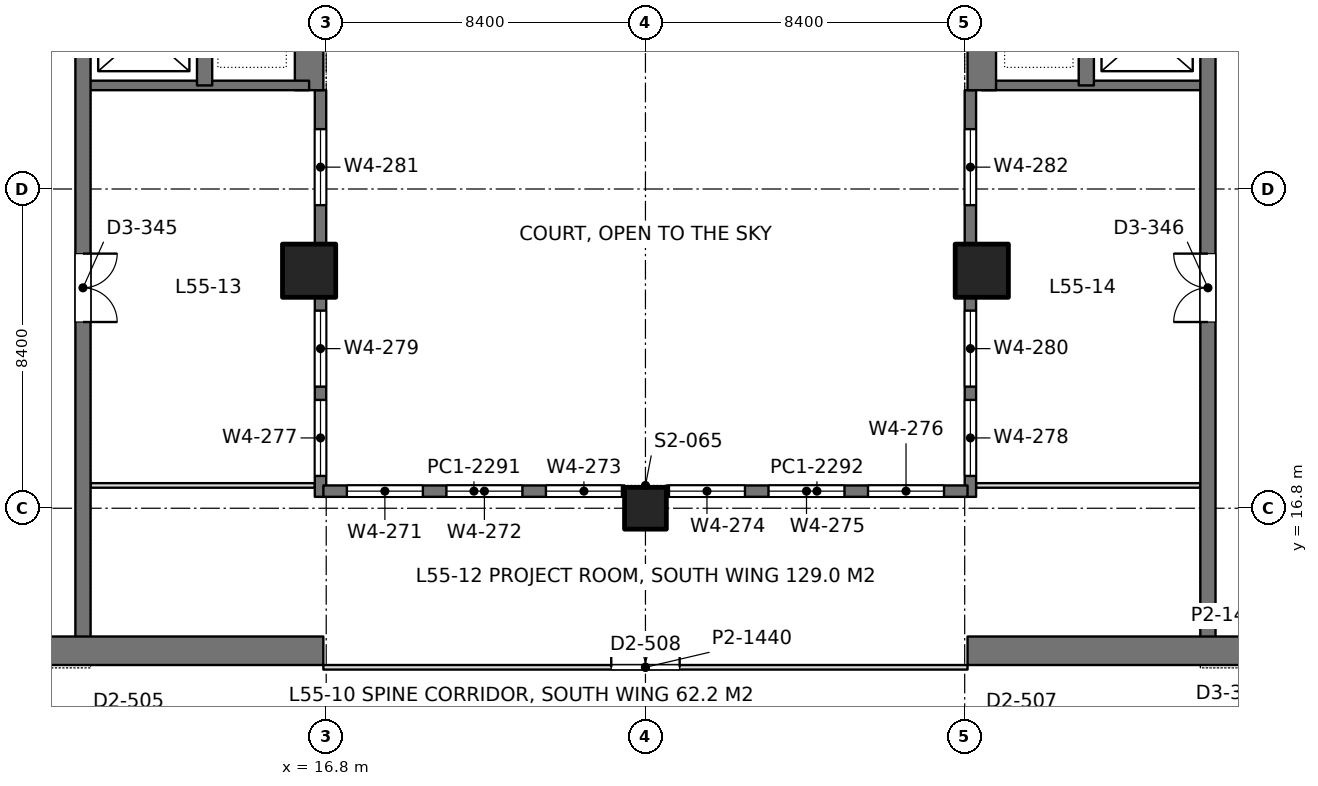
"""IFC4 building model, lengths in metres.
Left out: names, types, materials, properties, quantities, classifications, styles, units other than length and angle.
Written with IfcOpenShell. Run it as: python <this file> out.ifc"""

import sys

from ifc_helpers import new_model, si_unit, direction, frame, frame_2d, origin, origin_2d, place, context, subcontext, project, spatial, rectangle, extrude, element, fill, save


model = new_model("IFC4")
c1 = context("Model", 3, precision=1e-05, world=origin(), true_north=direction((0.0, 1.0)))
c2 = subcontext(c1, "Body", "Model", "MODEL_VIEW")
j1 = project(units=[si_unit("LENGTHUNIT", "METRE"), si_unit("PLANEANGLEUNIT", "RADIAN")], contexts=[c1])
p1 = place(None, origin())
s1 = spatial("IfcSite", under=j1, at=p1, CompositionType="ELEMENT")
p2 = place(p1, origin())
s2 = spatial("IfcBuilding", under=s1, at=p2, CompositionType="ELEMENT")
p3 = place(p2, frame((0.0, 0.0, 240.6)))
s3 = spatial("IfcBuildingStorey", under=s2, at=p3, CompositionType="ELEMENT", Elevation=240.6)
p4 = place(p3, frame((25.2, 16.8, 0.0), z_axis=(0.0, 0.0, 1.0), x_axis=(1.0, 0.0, 0.0)))
e1 = element("IfcColumn", 1, at=p4, inside=s3, PredefinedType="COLUMN", context=c2, shape_type="SweptSolid", body=[
    extrude(rectangle(XDim=1.1, YDim=1.1, at=origin_2d()), origin(), (0.0, 0.0, 1.0), 4.2),
])
for number, where, z_axis, x_axis in (
    (2, (16.35, 23.05, 0.0), (0.0, 0.0, 1.0), (1.0, 0.0, 0.0)),
    (3, (34.05, 23.05, 0.0), (0.0, 0.0, 1.0), (1.0, 0.0, 0.0)),
):
    element("IfcColumn", number, at=place(p3, frame(where, z_axis=z_axis, x_axis=x_axis)), inside=s3, PredefinedType="COLUMN", context=c2, shape_type="SweptSolid", body=[
        extrude(rectangle(XDim=1.4, YDim=1.4, at=origin_2d()), origin(), (0.0, 0.0, 1.0), 4.2),
    ])
p5 = place(p3, frame((-1.125, 13.05, 0.0), z_axis=(0.0, 0.0, 1.0), x_axis=(1.0, 0.0, 0.0)))
e4 = element("IfcWall", 4, at=p5, inside=s3, PredefinedType="SHEAR", context=c2, shape_type="SweptSolid", body=[
    extrude(rectangle(XDim=17.85, YDim=0.75, at=frame_2d((8.925, 0.0))), origin(), (0.0, 0.0, 1.0), 4.2),
])
p6 = place(p5, frame((8.875, 0.0, 0.0)))
e5 = element("IfcOpeningElement", 5, at=p6, cuts=e4, PredefinedType="OPENING", context=c2, shape_type="SweptSolid", body=[
    extrude(rectangle(XDim=1.8, YDim=2.4, at=frame_2d((0.9, 1.2))), frame((0.0, 0.385, 0.0), z_axis=(0.0, -1.0, 0.0), x_axis=(1.0, 0.0, 0.0)), (0.0, 0.0, 1.0), 0.77),
])
p7 = place(p3, frame((16.35, 27.8, 0.0), z_axis=(0.0, 0.0, 1.0), x_axis=(0.0, 1.0, 0.0)))
e6 = element("IfcWall", 6, at=p7, inside=s3, PredefinedType="SHEAR", context=c2, shape_type="SweptSolid", body=[
    extrude(rectangle(XDim=9.55, YDim=0.75, at=frame_2d((4.775, 0.0))), origin(), (0.0, 0.0, 1.0), 4.2),
])
p8 = place(p3, frame((10.4, 13.05, 0.0), z_axis=(0.0, 0.0, 1.0), x_axis=(0.0, 1.0, 0.0)))
e7 = element("IfcWall", 7, at=p8, inside=s3, PredefinedType="SHEAR", context=c2, shape_type="SweptSolid", body=[
    extrude(rectangle(XDim=24.3, YDim=0.4, at=frame_2d((12.15, 0.0))), origin(), (0.0, 0.0, 1.0), 4.2),
])
p9 = place(p8, frame((15.75, 0.0, 0.0)))
e8 = element("IfcOpeningElement", 8, at=p9, cuts=e7, PredefinedType="OPENING", context=c2, shape_type="SweptSolid", body=[
    extrude(rectangle(XDim=1.1, YDim=2.2, at=frame_2d((0.55, 1.1))), frame((0.0, 0.21, 0.0), z_axis=(0.0, -1.0, 0.0), x_axis=(1.0, 0.0, 0.0)), (0.0, 0.0, 1.0), 0.42),
])
p10 = place(p8, frame((18.6, 0.0, 0.0)))
e9 = element("IfcOpeningElement", 9, at=p10, cuts=e7, PredefinedType="OPENING", context=c2, shape_type="SweptSolid", body=[
    extrude(rectangle(XDim=1.1, YDim=2.2, at=frame_2d((0.55, 1.1))), frame((0.0, 0.21, 0.0), z_axis=(0.0, -1.0, 0.0), x_axis=(1.0, 0.0, 0.0)), (0.0, 0.0, 1.0), 0.42),
])
p11 = place(p8, frame((21.45, 0.0, 0.0)))
e10 = element("IfcOpeningElement", 10, at=p11, cuts=e7, PredefinedType="OPENING", context=c2, shape_type="SweptSolid", body=[
    extrude(rectangle(XDim=1.1, YDim=2.2, at=frame_2d((0.55, 1.1))), frame((0.0, 0.21, 0.0), z_axis=(0.0, -1.0, 0.0), x_axis=(1.0, 0.0, 0.0)), (0.0, 0.0, 1.0), 0.42),
])
p12 = place(p8, frame((8.65, 0.0, 0.0)))
e11 = element("IfcOpeningElement", 11, at=p12, cuts=e7, PredefinedType="OPENING", context=c2, shape_type="SweptSolid", body=[
    extrude(rectangle(XDim=1.8, YDim=2.4, at=frame_2d((0.9, 1.2))), frame((0.0, 0.21, 0.0), z_axis=(0.0, -1.0, 0.0), x_axis=(1.0, 0.0, 0.0)), (0.0, 0.0, 1.0), 0.42),
])
p13 = place(p3, frame((13.6, 27.925, 0.0), z_axis=(0.0, 0.0, 1.0), x_axis=(0.0, 1.0, 0.0)))
e12 = element("IfcWall", 12, at=p13, inside=s3, PredefinedType="SHEAR", context=c2, shape_type="SweptSolid", body=[
    extrude(rectangle(XDim=9.425, YDim=0.4, at=frame_2d((4.712, 0.0))), origin(), (0.0, 0.0, 1.0), 4.2),
])
p14 = place(p3, frame((10.4, 27.925, 0.0), z_axis=(0.0, 0.0, 1.0), x_axis=(1.0, 0.0, 0.0)))
e13 = element("IfcWall", 13, at=p14, inside=s3, PredefinedType="SHEAR", context=c2, shape_type="SweptSolid", body=[
    extrude(rectangle(XDim=5.95, YDim=0.25, at=frame_2d((2.975, 0.0))), origin(), (0.0, 0.0, 1.0), 4.2),
])
p15 = place(p3, frame((33.675, 13.05, 0.0), z_axis=(0.0, 0.0, 1.0), x_axis=(1.0, 0.0, 0.0)))
e14 = element("IfcWall", 14, at=p15, inside=s3, PredefinedType="SHEAR", context=c2, shape_type="SweptSolid", body=[
    extrude(rectangle(XDim=17.85, YDim=0.75, at=frame_2d((8.925, 0.0))), origin(), (0.0, 0.0, 1.0), 4.2),
])
p16 = place(p15, frame((7.175, 0.0, 0.0)))
e15 = element("IfcOpeningElement", 15, at=p16, cuts=e14, PredefinedType="OPENING", context=c2, shape_type="SweptSolid", body=[
    extrude(rectangle(XDim=1.8, YDim=2.4, at=frame_2d((0.9, 1.2))), frame((0.0, 0.385, 0.0), z_axis=(0.0, -1.0, 0.0), x_axis=(1.0, 0.0, 0.0)), (0.0, 0.0, 1.0), 0.77),
])
p17 = place(p3, frame((34.05, 27.8, 0.0), z_axis=(0.0, 0.0, 1.0), x_axis=(0.0, 1.0, 0.0)))
e16 = element("IfcWall", 16, at=p17, inside=s3, PredefinedType="SHEAR", context=c2, shape_type="SweptSolid", body=[
    extrude(rectangle(XDim=9.55, YDim=0.75, at=frame_2d((4.775, 0.0))), origin(), (0.0, 0.0, 1.0), 4.2),
])
p18 = place(p3, frame((40.0, 13.05, 0.0), z_axis=(0.0, 0.0, 1.0), x_axis=(0.0, 1.0, 0.0)))
e17 = element("IfcWall", 17, at=p18, inside=s3, PredefinedType="SHEAR", context=c2, shape_type="SweptSolid", body=[
    extrude(rectangle(XDim=24.3, YDim=0.4, at=frame_2d((12.15, 0.0))), origin(), (0.0, 0.0, 1.0), 4.2),
])
p19 = place(p18, frame((15.75, 0.0, 0.0)))
e18 = element("IfcOpeningElement", 18, at=p19, cuts=e17, PredefinedType="OPENING", context=c2, shape_type="SweptSolid", body=[
    extrude(rectangle(XDim=1.1, YDim=2.2, at=frame_2d((0.55, 1.1))), frame((0.0, 0.21, 0.0), z_axis=(0.0, -1.0, 0.0), x_axis=(1.0, 0.0, 0.0)), (0.0, 0.0, 1.0), 0.42),
])
p20 = place(p18, frame((18.6, 0.0, 0.0)))
e19 = element("IfcOpeningElement", 19, at=p20, cuts=e17, PredefinedType="OPENING", context=c2, shape_type="SweptSolid", body=[
    extrude(rectangle(XDim=1.1, YDim=2.2, at=frame_2d((0.55, 1.1))), frame((0.0, 0.21, 0.0), z_axis=(0.0, -1.0, 0.0), x_axis=(1.0, 0.0, 0.0)), (0.0, 0.0, 1.0), 0.42),
])
p21 = place(p18, frame((21.45, 0.0, 0.0)))
e20 = element("IfcOpeningElement", 20, at=p21, cuts=e17, PredefinedType="OPENING", context=c2, shape_type="SweptSolid", body=[
    extrude(rectangle(XDim=1.1, YDim=2.2, at=frame_2d((0.55, 1.1))), frame((0.0, 0.21, 0.0), z_axis=(0.0, -1.0, 0.0), x_axis=(1.0, 0.0, 0.0)), (0.0, 0.0, 1.0), 0.42),
])
p22 = place(p18, frame((8.65, 0.0, 0.0)))
e21 = element("IfcOpeningElement", 21, at=p22, cuts=e17, PredefinedType="OPENING", context=c2, shape_type="SweptSolid", body=[
    extrude(rectangle(XDim=1.8, YDim=2.4, at=frame_2d((0.9, 1.2))), frame((0.0, 0.21, 0.0), z_axis=(0.0, -1.0, 0.0), x_axis=(1.0, 0.0, 0.0)), (0.0, 0.0, 1.0), 0.42),
])
p23 = place(p3, frame((36.8, 27.925, 0.0), z_axis=(0.0, 0.0, 1.0), x_axis=(0.0, 1.0, 0.0)))
e22 = element("IfcWall", 22, at=p23, inside=s3, PredefinedType="SHEAR", context=c2, shape_type="SweptSolid", body=[
    extrude(rectangle(XDim=9.425, YDim=0.4, at=frame_2d((4.712, 0.0))), origin(), (0.0, 0.0, 1.0), 4.2),
])
p24 = place(p3, frame((40.0, 27.925, 0.0), z_axis=(0.0, 0.0, 1.0), x_axis=(-1.0, 0.0, 0.0)))
e23 = element("IfcWall", 23, at=p24, inside=s3, PredefinedType="SHEAR", context=c2, shape_type="SweptSolid", body=[
    extrude(rectangle(XDim=5.95, YDim=0.25, at=frame_2d((2.975, 0.0))), origin(), (0.0, 0.0, 1.0), 4.2),
])
p25 = place(p3, frame((16.65, 17.1, 0.0), z_axis=(0.0, 0.0, 1.0), x_axis=(0.0, 1.0, 0.0)))
e24 = element("IfcWall", 24, at=p25, inside=s3, PredefinedType="SOLIDWALL", context=c2, shape_type="SweptSolid", body=[
    extrude(rectangle(XDim=10.7, YDim=0.3, at=frame_2d((5.35, 0.0))), origin(), (0.0, 0.0, 1.0), 4.0),
])
p26 = place(p25, frame((0.55, 0.0, 0.9)))
e25 = element("IfcOpeningElement", 25, at=p26, cuts=e24, PredefinedType="OPENING", context=c2, shape_type="SweptSolid", body=[
    extrude(rectangle(XDim=2.0, YDim=1.9, at=frame_2d((1.0, 0.95))), frame((0.0, 0.16, 0.0), z_axis=(0.0, -1.0, 0.0), x_axis=(1.0, 0.0, 0.0)), (0.0, 0.0, 1.0), 0.32),
])
p27 = place(p25, frame((2.9, 0.0, 0.9)))
e26 = element("IfcOpeningElement", 26, at=p27, cuts=e24, PredefinedType="OPENING", context=c2, shape_type="SweptSolid", body=[
    extrude(rectangle(XDim=2.0, YDim=1.9, at=frame_2d((1.0, 0.95))), frame((0.0, 0.16, 0.0), z_axis=(0.0, -1.0, 0.0), x_axis=(1.0, 0.0, 0.0)), (0.0, 0.0, 1.0), 0.32),
])
p28 = place(p25, frame((7.675, 0.0, 0.9)))
e27 = element("IfcOpeningElement", 27, at=p28, cuts=e24, PredefinedType="OPENING", context=c2, shape_type="SweptSolid", body=[
    extrude(rectangle(XDim=2.0, YDim=1.9, at=frame_2d((1.0, 0.95))), frame((0.0, 0.16, 0.0), z_axis=(0.0, -1.0, 0.0), x_axis=(1.0, 0.0, 0.0)), (0.0, 0.0, 1.0), 0.32),
])
p29 = place(p3, frame((33.75, 17.1, 0.0), z_axis=(0.0, 0.0, 1.0), x_axis=(0.0, 1.0, 0.0)))
e28 = element("IfcWall", 28, at=p29, inside=s3, PredefinedType="SOLIDWALL", context=c2, shape_type="SweptSolid", body=[
    extrude(rectangle(XDim=10.7, YDim=0.3, at=frame_2d((5.35, 0.0))), origin(), (0.0, 0.0, 1.0), 4.0),
])
p30 = place(p29, frame((0.55, 0.0, 0.9)))
e29 = element("IfcOpeningElement", 29, at=p30, cuts=e28, PredefinedType="OPENING", context=c2, shape_type="SweptSolid", body=[
    extrude(rectangle(XDim=2.0, YDim=1.9, at=frame_2d((1.0, 0.95))), frame((0.0, 0.16, 0.0), z_axis=(0.0, -1.0, 0.0), x_axis=(1.0, 0.0, 0.0)), (0.0, 0.0, 1.0), 0.32),
])
p31 = place(p29, frame((2.9, 0.0, 0.9)))
e30 = element("IfcOpeningElement", 30, at=p31, cuts=e28, PredefinedType="OPENING", context=c2, shape_type="SweptSolid", body=[
    extrude(rectangle(XDim=2.0, YDim=1.9, at=frame_2d((1.0, 0.95))), frame((0.0, 0.16, 0.0), z_axis=(0.0, -1.0, 0.0), x_axis=(1.0, 0.0, 0.0)), (0.0, 0.0, 1.0), 0.32),
])
p32 = place(p29, frame((7.675, 0.0, 0.9)))
e31 = element("IfcOpeningElement", 31, at=p32, cuts=e28, PredefinedType="OPENING", context=c2, shape_type="SweptSolid", body=[
    extrude(rectangle(XDim=2.0, YDim=1.9, at=frame_2d((1.0, 0.95))), frame((0.0, 0.16, 0.0), z_axis=(0.0, -1.0, 0.0), x_axis=(1.0, 0.0, 0.0)), (0.0, 0.0, 1.0), 0.32),
])
p33 = place(p3, frame((16.725, 17.25, 0.0), z_axis=(0.0, 0.0, 1.0), x_axis=(1.0, 0.0, 0.0)))
e32 = element("IfcWall", 32, at=p33, inside=s3, PredefinedType="SOLIDWALL", context=c2, shape_type="SweptSolid", body=[
    extrude(rectangle(XDim=7.925, YDim=0.3, at=frame_2d((3.962, 0.0))), origin(), (0.0, 0.0, 1.0), 4.0),
])
p34 = place(p33, frame((0.619, 0.0, 0.9)))
e33 = element("IfcOpeningElement", 33, at=p34, cuts=e32, PredefinedType="OPENING", context=c2, shape_type="SweptSolid", body=[
    extrude(rectangle(XDim=2.0, YDim=1.9, at=frame_2d((1.0, 0.95))), frame((0.0, 0.16, 0.0), z_axis=(0.0, -1.0, 0.0), x_axis=(1.0, 0.0, 0.0)), (0.0, 0.0, 1.0), 0.32),
])
p35 = place(p33, frame((3.238, 0.0, 0.9)))
e34 = element("IfcOpeningElement", 34, at=p35, cuts=e32, PredefinedType="OPENING", context=c2, shape_type="SweptSolid", body=[
    extrude(rectangle(XDim=2.0, YDim=1.9, at=frame_2d((1.0, 0.95))), frame((0.0, 0.16, 0.0), z_axis=(0.0, -1.0, 0.0), x_axis=(1.0, 0.0, 0.0)), (0.0, 0.0, 1.0), 0.32),
])
p36 = place(p33, frame((5.856, 0.0, 0.9)))
e35 = element("IfcOpeningElement", 35, at=p36, cuts=e32, PredefinedType="OPENING", context=c2, shape_type="SweptSolid", body=[
    extrude(rectangle(XDim=2.0, YDim=1.9, at=frame_2d((1.0, 0.95))), frame((0.0, 0.16, 0.0), z_axis=(0.0, -1.0, 0.0), x_axis=(1.0, 0.0, 0.0)), (0.0, 0.0, 1.0), 0.32),
])
p37 = place(p3, frame((25.75, 17.25, 0.0), z_axis=(0.0, 0.0, 1.0), x_axis=(1.0, 0.0, 0.0)))
e36 = element("IfcWall", 36, at=p37, inside=s3, PredefinedType="SOLIDWALL", context=c2, shape_type="SweptSolid", body=[
    extrude(rectangle(XDim=7.925, YDim=0.3, at=frame_2d((3.962, 0.0))), origin(), (0.0, 0.0, 1.0), 4.0),
])
p38 = place(p37, frame((0.069, 0.0, 0.9)))
e37 = element("IfcOpeningElement", 37, at=p38, cuts=e36, PredefinedType="OPENING", context=c2, shape_type="SweptSolid", body=[
    extrude(rectangle(XDim=2.0, YDim=1.9, at=frame_2d((1.0, 0.95))), frame((0.0, 0.16, 0.0), z_axis=(0.0, -1.0, 0.0), x_axis=(1.0, 0.0, 0.0)), (0.0, 0.0, 1.0), 0.32),
])
p39 = place(p37, frame((2.688, 0.0, 0.9)))
e38 = element("IfcOpeningElement", 38, at=p39, cuts=e36, PredefinedType="OPENING", context=c2, shape_type="SweptSolid", body=[
    extrude(rectangle(XDim=2.0, YDim=1.9, at=frame_2d((1.0, 0.95))), frame((0.0, 0.16, 0.0), z_axis=(0.0, -1.0, 0.0), x_axis=(1.0, 0.0, 0.0)), (0.0, 0.0, 1.0), 0.32),
])
p40 = place(p37, frame((5.306, 0.0, 0.9)))
e39 = element("IfcOpeningElement", 39, at=p40, cuts=e36, PredefinedType="OPENING", context=c2, shape_type="SweptSolid", body=[
    extrude(rectangle(XDim=2.0, YDim=1.9, at=frame_2d((1.0, 0.95))), frame((0.0, 0.16, 0.0), z_axis=(0.0, -1.0, 0.0), x_axis=(1.0, 0.0, 0.0)), (0.0, 0.0, 1.0), 0.32),
])
for number, where, z_axis, x_axis in (
    (40, (10.598, 17.4, 0.0), (0.0, 0.0, 1.0), (1.0, 0.0, 0.0)),
    (41, (33.898, 17.4, 0.0), (0.0, 0.0, 1.0), (1.0, 0.0, 0.0)),
):
    element("IfcWall", number, at=place(p3, frame(where, z_axis=z_axis, x_axis=x_axis)), inside=s3, PredefinedType="PARTITIONING", context=c2, shape_type="SweptSolid", body=[
        extrude(rectangle(XDim=5.904, YDim=0.12, at=frame_2d((2.952, 0.0))), origin(), (0.0, 0.0, 1.0), 3.3),
    ])
p41 = place(p3, frame((16.725, 12.615, 0.0), z_axis=(0.0, 0.0, 1.0), x_axis=(1.0, 0.0, 0.0)))
e42 = element("IfcWall", 42, at=p41, inside=s3, PredefinedType="PARTITIONING", context=c2, shape_type="SweptSolid", body=[
    extrude(rectangle(XDim=16.95, YDim=0.12, at=frame_2d((8.475, 0.0))), origin(), (0.0, 0.0, 1.0), 3.3),
])
p42 = place(p41, frame((7.575, 0.0, 0.0)))
e43 = element("IfcOpeningElement", 43, at=p42, cuts=e42, PredefinedType="OPENING", context=c2, shape_type="SweptSolid", body=[
    extrude(rectangle(XDim=1.8, YDim=2.2, at=frame_2d((0.9, 1.1))), frame((0.0, 0.07, 0.0), z_axis=(0.0, -1.0, 0.0), x_axis=(1.0, 0.0, 0.0)), (0.0, 0.0, 1.0), 0.14),
])
p43 = place(p26, origin())
e44 = element("IfcWindow", 44, at=p43, inside=s3, PartitioningType="SINGLE_PANEL", PredefinedType="WINDOW", context=c2, shape_type="SweptSolid", body=[
    extrude(rectangle(XDim=2.0, YDim=1.9, at=frame_2d((1.0, 0.95))), frame((0.0, 0.03, 0.0), z_axis=(0.0, -1.0, 0.0), x_axis=(1.0, 0.0, 0.0)), (0.0, 0.0, 1.0), 0.06),
])
fill(e25, e44)
p44 = place(p27, origin())
e45 = element("IfcWindow", 45, at=p44, inside=s3, PartitioningType="SINGLE_PANEL", PredefinedType="WINDOW", context=c2, shape_type="SweptSolid", body=[
    extrude(rectangle(XDim=2.0, YDim=1.9, at=frame_2d((1.0, 0.95))), frame((0.0, 0.03, 0.0), z_axis=(0.0, -1.0, 0.0), x_axis=(1.0, 0.0, 0.0)), (0.0, 0.0, 1.0), 0.06),
])
fill(e26, e45)
p45 = place(p28, origin())
e46 = element("IfcWindow", 46, at=p45, inside=s3, PartitioningType="SINGLE_PANEL", PredefinedType="WINDOW", context=c2, shape_type="SweptSolid", body=[
    extrude(rectangle(XDim=2.0, YDim=1.9, at=frame_2d((1.0, 0.95))), frame((0.0, 0.03, 0.0), z_axis=(0.0, -1.0, 0.0), x_axis=(1.0, 0.0, 0.0)), (0.0, 0.0, 1.0), 0.06),
])
fill(e27, e46)
p46 = place(p30, origin())
e47 = element("IfcWindow", 47, at=p46, inside=s3, PartitioningType="SINGLE_PANEL", PredefinedType="WINDOW", context=c2, shape_type="SweptSolid", body=[
    extrude(rectangle(XDim=2.0, YDim=1.9, at=frame_2d((1.0, 0.95))), frame((0.0, 0.03, 0.0), z_axis=(0.0, -1.0, 0.0), x_axis=(1.0, 0.0, 0.0)), (0.0, 0.0, 1.0), 0.06),
])
fill(e29, e47)
p47 = place(p31, origin())
e48 = element("IfcWindow", 48, at=p47, inside=s3, PartitioningType="SINGLE_PANEL", PredefinedType="WINDOW", context=c2, shape_type="SweptSolid", body=[
    extrude(rectangle(XDim=2.0, YDim=1.9, at=frame_2d((1.0, 0.95))), frame((0.0, 0.03, 0.0), z_axis=(0.0, -1.0, 0.0), x_axis=(1.0, 0.0, 0.0)), (0.0, 0.0, 1.0), 0.06),
])
fill(e30, e48)
p48 = place(p32, origin())
e49 = element("IfcWindow", 49, at=p48, inside=s3, PartitioningType="SINGLE_PANEL", PredefinedType="WINDOW", context=c2, shape_type="SweptSolid", body=[
    extrude(rectangle(XDim=2.0, YDim=1.9, at=frame_2d((1.0, 0.95))), frame((0.0, 0.03, 0.0), z_axis=(0.0, -1.0, 0.0), x_axis=(1.0, 0.0, 0.0)), (0.0, 0.0, 1.0), 0.06),
])
fill(e31, e49)
p49 = place(p34, origin())
e50 = element("IfcWindow", 50, at=p49, inside=s3, PartitioningType="SINGLE_PANEL", PredefinedType="WINDOW", context=c2, shape_type="SweptSolid", body=[
    extrude(rectangle(XDim=2.0, YDim=1.9, at=frame_2d((1.0, 0.95))), frame((0.0, 0.03, 0.0), z_axis=(0.0, -1.0, 0.0), x_axis=(1.0, 0.0, 0.0)), (0.0, 0.0, 1.0), 0.06),
])
fill(e33, e50)
p50 = place(p35, origin())
e51 = element("IfcWindow", 51, at=p50, inside=s3, PartitioningType="SINGLE_PANEL", PredefinedType="WINDOW", context=c2, shape_type="SweptSolid", body=[
    extrude(rectangle(XDim=2.0, YDim=1.9, at=frame_2d((1.0, 0.95))), frame((0.0, 0.03, 0.0), z_axis=(0.0, -1.0, 0.0), x_axis=(1.0, 0.0, 0.0)), (0.0, 0.0, 1.0), 0.06),
])
fill(e34, e51)
p51 = place(p36, origin())
e52 = element("IfcWindow", 52, at=p51, inside=s3, PartitioningType="SINGLE_PANEL", PredefinedType="WINDOW", context=c2, shape_type="SweptSolid", body=[
    extrude(rectangle(XDim=2.0, YDim=1.9, at=frame_2d((1.0, 0.95))), frame((0.0, 0.03, 0.0), z_axis=(0.0, -1.0, 0.0), x_axis=(1.0, 0.0, 0.0)), (0.0, 0.0, 1.0), 0.06),
])
fill(e35, e52)
p52 = place(p38, origin())
e53 = element("IfcWindow", 53, at=p52, inside=s3, PartitioningType="SINGLE_PANEL", PredefinedType="WINDOW", context=c2, shape_type="SweptSolid", body=[
    extrude(rectangle(XDim=2.0, YDim=1.9, at=frame_2d((1.0, 0.95))), frame((0.0, 0.03, 0.0), z_axis=(0.0, -1.0, 0.0), x_axis=(1.0, 0.0, 0.0)), (0.0, 0.0, 1.0), 0.06),
])
fill(e37, e53)
p53 = place(p39, origin())
e54 = element("IfcWindow", 54, at=p53, inside=s3, PartitioningType="SINGLE_PANEL", PredefinedType="WINDOW", context=c2, shape_type="SweptSolid", body=[
    extrude(rectangle(XDim=2.0, YDim=1.9, at=frame_2d((1.0, 0.95))), frame((0.0, 0.03, 0.0), z_axis=(0.0, -1.0, 0.0), x_axis=(1.0, 0.0, 0.0)), (0.0, 0.0, 1.0), 0.06),
])
fill(e38, e54)
p54 = place(p40, origin())
e55 = element("IfcWindow", 55, at=p54, inside=s3, PartitioningType="SINGLE_PANEL", PredefinedType="WINDOW", context=c2, shape_type="SweptSolid", body=[
    extrude(rectangle(XDim=2.0, YDim=1.9, at=frame_2d((1.0, 0.95))), frame((0.0, 0.03, 0.0), z_axis=(0.0, -1.0, 0.0), x_axis=(1.0, 0.0, 0.0)), (0.0, 0.0, 1.0), 0.06),
])
fill(e39, e55)
p55 = place(p12, frame((1.8, 0.0, 0.0), z_axis=(0.0, 0.0, 1.0), x_axis=(-1.0, 0.0, 0.0)))
e56 = element("IfcDoor", 56, at=p55, inside=s3, OperationType="DOUBLE_DOOR_SINGLE_SWING", PredefinedType="DOOR", context=c2, shape_type="SweptSolid", body=[
    extrude(rectangle(XDim=1.8, YDim=2.4, at=frame_2d((0.9, 1.2))), frame((0.0, 0.025, 0.0), z_axis=(0.0, -1.0, 0.0), x_axis=(1.0, 0.0, 0.0)), (0.0, 0.0, 1.0), 0.05),
])
fill(e11, e56)
p56 = place(p22, origin())
e57 = element("IfcDoor", 57, at=p56, inside=s3, OperationType="DOUBLE_DOOR_SINGLE_SWING", PredefinedType="DOOR", context=c2, shape_type="SweptSolid", body=[
    extrude(rectangle(XDim=1.8, YDim=2.4, at=frame_2d((0.9, 1.2))), frame((0.0, 0.025, 0.0), z_axis=(0.0, -1.0, 0.0), x_axis=(1.0, 0.0, 0.0)), (0.0, 0.0, 1.0), 0.05),
])
fill(e21, e57)
p57 = place(p42, origin())
e58 = element("IfcDoor", 58, at=p57, inside=s3, OperationType="DOUBLE_DOOR_SINGLE_SWING", PredefinedType="DOOR", context=c2, shape_type="SweptSolid", body=[
    extrude(rectangle(XDim=1.8, YDim=2.2, at=frame_2d((0.9, 1.1))), frame((0.0, 0.025, 0.0), z_axis=(0.0, -1.0, 0.0), x_axis=(1.0, 0.0, 0.0)), (0.0, 0.0, 1.0), 0.05),
])
fill(e43, e58)
save(model, sys.argv[1])
